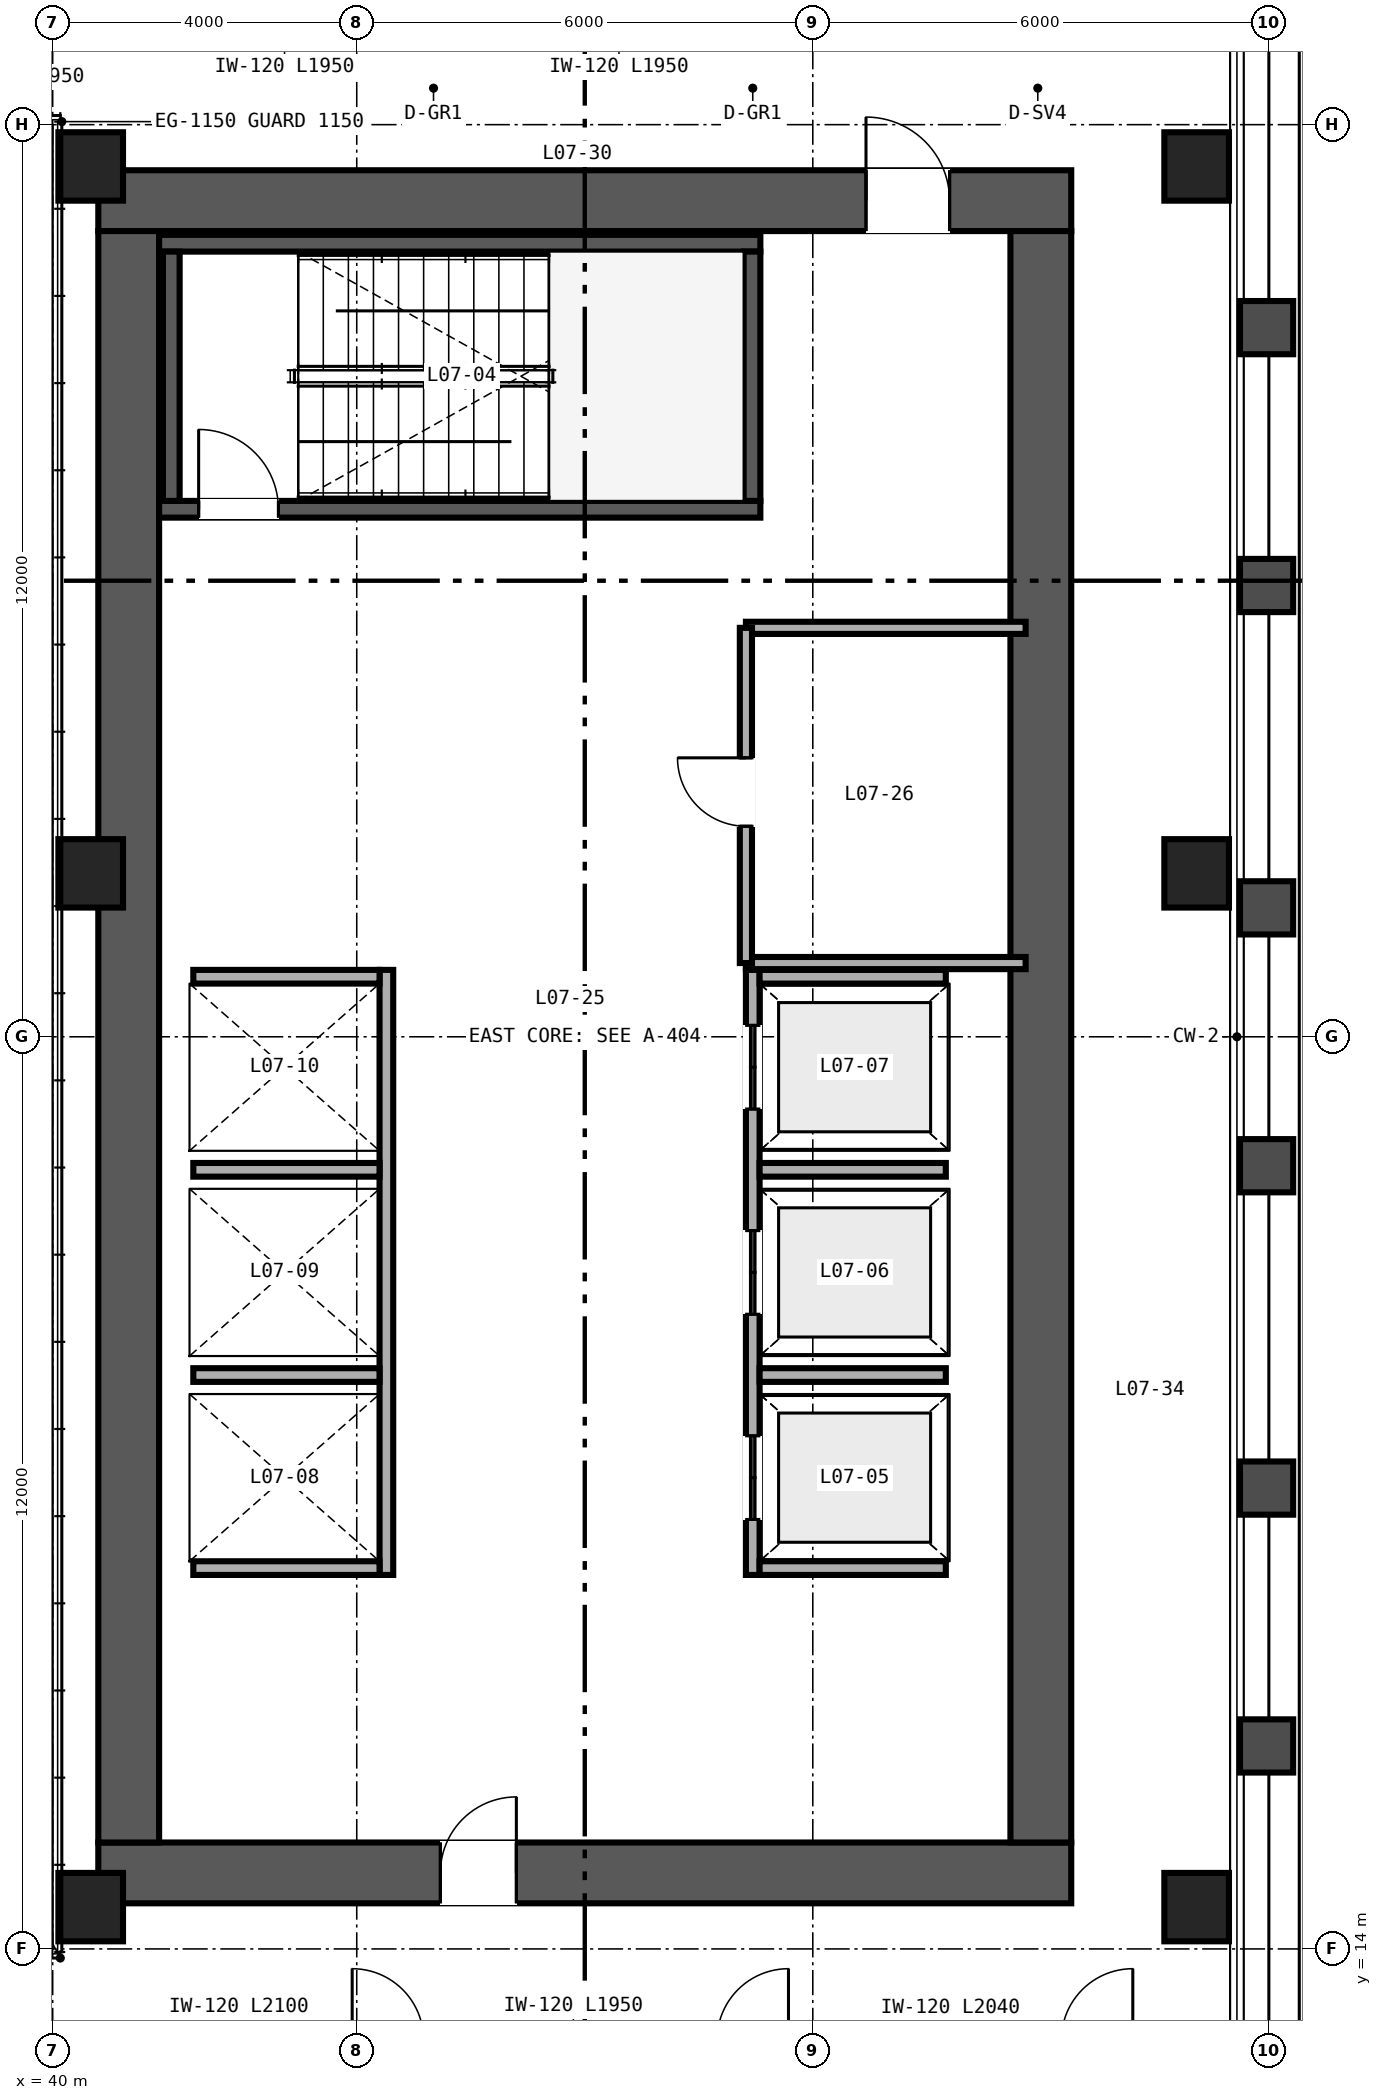
"""IFC4 building model, lengths in metres.
Left out: names, types, materials, properties, quantities, classifications, styles, units other than length and angle.
Written with IfcOpenShell. Run it as: python <this file> out.ifc"""

import sys

from ifc_helpers import new_model, si_unit, direction, frame, frame_2d, origin, origin_2d, place, context, subcontext, project, spatial, rectangle, hollow_rectangle, extrude, source, transform, mapped, element, fill, save


model = new_model("IFC4")
c1 = context("Model", 3, precision=1e-05, world=origin(), true_north=direction((0.0, 1.0)))
c2 = subcontext(c1, "Body", "Model", "MODEL_VIEW")
j1 = project(units=[si_unit("LENGTHUNIT", "METRE"), si_unit("PLANEANGLEUNIT", "RADIAN")], contexts=[c1])
p1 = place(None, origin())
s1 = spatial("IfcSite", under=j1, at=p1, CompositionType="ELEMENT")
p2 = place(p1, origin())
s2 = spatial("IfcBuilding", under=s1, at=p2, CompositionType="ELEMENT")
p3 = place(p2, frame((0.0, 0.0, 34.8)))
s3 = spatial("IfcBuildingStorey", under=s2, at=p3, CompositionType="ELEMENT", Elevation=34.8)
p4 = place(p3, frame((40.6, 15.0, 0.0), z_axis=(0.0, 0.0, 1.0), x_axis=(1.0, 0.0, 0.0)))
e1 = element("IfcWall", 1, at=p4, inside=s3, PredefinedType="SHEAR", context=c2, shape_type="SweptSolid", body=[
    extrude(rectangle(XDim=12.8, YDim=0.8, at=frame_2d((6.4, 0.0))), origin(), (0.0, 0.0, 1.0), 3.35),
])
p5 = place(p4, frame((4.5, 0.0, 0.0)))
e2 = element("IfcOpeningElement", 2, at=p5, cuts=e1, PredefinedType="OPENING", context=c2, shape_type="SweptSolid", body=[
    extrude(rectangle(XDim=1.0, YDim=2.15, at=frame_2d((0.5, 1.075))), frame((0.0, 0.41, 0.0), z_axis=(0.0, -1.0, 0.0), x_axis=(1.0, 0.0, 0.0)), (0.0, 0.0, 1.0), 0.82),
])
p6 = place(p3, frame((40.6, 37.0, 0.0), z_axis=(0.0, 0.0, 1.0), x_axis=(1.0, 0.0, 0.0)))
e3 = element("IfcWall", 3, at=p6, inside=s3, PredefinedType="SHEAR", context=c2, shape_type="SweptSolid", body=[
    extrude(rectangle(XDim=12.8, YDim=0.8, at=frame_2d((6.4, 0.0))), origin(), (0.0, 0.0, 1.0), 3.35),
])
p7 = place(p6, frame((10.1, 0.0, 0.0)))
e4 = element("IfcOpeningElement", 4, at=p7, cuts=e3, PredefinedType="OPENING", context=c2, shape_type="SweptSolid", body=[
    extrude(rectangle(XDim=1.1, YDim=2.15, at=frame_2d((0.55, 1.075))), frame((0.0, 0.41, 0.0), z_axis=(0.0, -1.0, 0.0), x_axis=(1.0, 0.0, 0.0)), (0.0, 0.0, 1.0), 0.82),
])
for number, where, z_axis, x_axis in (
    (5, (41.0, 15.4, 0.0), (0.0, 0.0, 1.0), (0.0, 1.0, 0.0)),
    (6, (53.0, 15.4, 0.0), (0.0, 0.0, 1.0), (0.0, 1.0, 0.0)),
):
    element("IfcWall", number, at=place(p3, frame(where, z_axis=z_axis, x_axis=x_axis)), inside=s3, PredefinedType="SHEAR", context=c2, shape_type="SweptSolid", body=[
        extrude(rectangle(XDim=21.2, YDim=0.8, at=frame_2d((10.6, 0.0))), origin(), (0.0, 0.0, 1.0), 3.35),
    ])
p8 = place(p3, frame((41.4, 32.94, 0.0), z_axis=(0.0, 0.0, 1.0), x_axis=(1.0, 0.0, 0.0)))
e7 = element("IfcWall", 7, at=p8, inside=s3, PredefinedType="SHEAR", context=c2, shape_type="SweptSolid", body=[
    extrude(rectangle(XDim=7.91, YDim=0.22, at=frame_2d((3.955, 0.0))), origin(), (0.0, 0.0, 1.0), 3.4),
])
p9 = place(p8, frame((0.52, 0.0, 0.0)))
e8 = element("IfcOpeningElement", 8, at=p9, cuts=e7, PredefinedType="OPENING", context=c2, shape_type="SweptSolid", body=[
    extrude(rectangle(XDim=1.05, YDim=2.15, at=frame_2d((0.525, 1.075))), frame((0.0, 0.12, 0.0), z_axis=(0.0, -1.0, 0.0), x_axis=(1.0, 0.0, 0.0)), (0.0, 0.0, 1.0), 0.24),
])
p10 = place(p3, frame((41.4, 36.44, 0.0), z_axis=(0.0, 0.0, 1.0), x_axis=(1.0, 0.0, 0.0)))
e9 = element("IfcWall", 9, at=p10, inside=s3, PredefinedType="SHEAR", context=c2, shape_type="SweptSolid", body=[
    extrude(rectangle(XDim=7.91, YDim=0.22, at=frame_2d((3.955, 0.0))), origin(), (0.0, 0.0, 1.0), 3.4),
])
for number, where, z_axis, x_axis in (
    (10, (41.56, 33.05, 0.0), (0.0, 0.0, 1.0), (0.0, 1.0, 0.0)),
    (11, (49.2, 33.05, 0.0), (0.0, 0.0, 1.0), (0.0, 1.0, 0.0)),
):
    element("IfcWall", number, at=place(p3, frame(where, z_axis=z_axis, x_axis=x_axis)), inside=s3, PredefinedType="SHEAR", context=c2, shape_type="SweptSolid", body=[
        extrude(rectangle(XDim=3.28, YDim=0.22, at=frame_2d((1.64, 0.0))), origin(), (0.0, 0.0, 1.0), 3.4),
    ])
m1 = source(origin(), c2, "Body", "SweptSolid", [
    extrude(hollow_rectangle(XDim=0.85, YDim=0.9, WallThickness=0.04, at=origin_2d()), origin(), (0.0, 0.0, 1.0), 3.35),
])
for number, where, z_axis, x_axis in (
    (12, (40.5, 14.55, 0.0), (0.0, 0.0, 1.0), (1.0, 0.0, 0.0)),
    (13, (55.05, 14.55, 0.0), (0.0, 0.0, 1.0), (1.0, 0.0, 0.0)),
    (14, (40.5, 28.15, 0.0), (0.0, 0.0, 1.0), (1.0, 0.0, 0.0)),
    (15, (55.05, 28.15, 0.0), (0.0, 0.0, 1.0), (1.0, 0.0, 0.0)),
    (16, (40.5, 37.45, 0.0), (0.0, 0.0, 1.0), (1.0, 0.0, 0.0)),
    (17, (55.05, 37.45, 0.0), (0.0, 0.0, 1.0), (1.0, 0.0, 0.0)),
):
    element("IfcColumn", number, at=place(p3, frame(where, z_axis=z_axis, x_axis=x_axis)), inside=s3, PredefinedType="COLUMN", context=c2, shape_type="MappedRepresentation", body=[
        mapped(m1, transform((0.0, 0.0, 0.0), scale=1.0)),
    ])
p11 = place(p3, frame((49.21, 18.92, 0.0), z_axis=(0.0, 0.0, 1.0), x_axis=(0.0, 1.0, 0.0)))
e18 = element("IfcWall", 18, at=p11, inside=s3, PredefinedType="SOLIDWALL", context=c2, shape_type="SweptSolid", body=[
    extrude(rectangle(XDim=7.96, YDim=0.18, at=frame_2d((3.98, 0.0))), origin(), (0.0, 0.0, 1.0), 3.35),
])
p12 = place(p11, frame((0.73, 0.0, 0.0)))
e19 = element("IfcOpeningElement", 19, at=p12, cuts=e18, PredefinedType="OPENING", context=c2, shape_type="SweptSolid", body=[
    extrude(rectangle(XDim=1.1, YDim=2.2, at=frame_2d((0.55, 1.1))), frame((0.0, 0.1, 0.0), z_axis=(0.0, -1.0, 0.0), x_axis=(1.0, 0.0, 0.0)), (0.0, 0.0, 1.0), 0.2),
])
p13 = place(p11, frame((3.43, 0.0, 0.0)))
e20 = element("IfcOpeningElement", 20, at=p13, cuts=e18, PredefinedType="OPENING", context=c2, shape_type="SweptSolid", body=[
    extrude(rectangle(XDim=1.1, YDim=2.2, at=frame_2d((0.55, 1.1))), frame((0.0, 0.1, 0.0), z_axis=(0.0, -1.0, 0.0), x_axis=(1.0, 0.0, 0.0)), (0.0, 0.0, 1.0), 0.2),
])
p14 = place(p11, frame((6.13, 0.0, 0.0)))
e21 = element("IfcOpeningElement", 21, at=p14, cuts=e18, PredefinedType="OPENING", context=c2, shape_type="SweptSolid", body=[
    extrude(rectangle(XDim=1.1, YDim=2.2, at=frame_2d((0.55, 1.1))), frame((0.0, 0.1, 0.0), z_axis=(0.0, -1.0, 0.0), x_axis=(1.0, 0.0, 0.0)), (0.0, 0.0, 1.0), 0.2),
])
for number, where, z_axis, x_axis in (
    (22, (49.3, 19.01, 0.0), (0.0, 0.0, 1.0), (1.0, 0.0, 0.0)),
    (23, (49.3, 26.79, 0.0), (0.0, 0.0, 1.0), (1.0, 0.0, 0.0)),
    (24, (49.3, 21.55, 0.0), (0.0, 0.0, 1.0), (1.0, 0.0, 0.0)),
    (25, (49.3, 24.25, 0.0), (0.0, 0.0, 1.0), (1.0, 0.0, 0.0)),
):
    element("IfcWall", number, at=place(p3, frame(where, z_axis=z_axis, x_axis=x_axis)), inside=s3, PredefinedType="SOLIDWALL", context=c2, shape_type="SweptSolid", body=[
        extrude(rectangle(XDim=2.45, YDim=0.18, at=frame_2d((1.225, 0.0))), origin(), (0.0, 0.0, 1.0), 3.35),
    ])
p15 = place(p3, frame((44.39, 18.92, 0.0), z_axis=(0.0, 0.0, 1.0), x_axis=(0.0, 1.0, 0.0)))
e26 = element("IfcWall", 26, at=p15, inside=s3, PredefinedType="SOLIDWALL", context=c2, shape_type="SweptSolid", body=[
    extrude(rectangle(XDim=7.96, YDim=0.18, at=frame_2d((3.98, 0.0))), origin(), (0.0, 0.0, 1.0), 3.35),
])
for number, where, z_axis, x_axis in (
    (27, (41.85, 19.01, 0.0), (0.0, 0.0, 1.0), (1.0, 0.0, 0.0)),
    (28, (41.85, 26.79, 0.0), (0.0, 0.0, 1.0), (1.0, 0.0, 0.0)),
    (29, (41.85, 21.55, 0.0), (0.0, 0.0, 1.0), (1.0, 0.0, 0.0)),
    (30, (41.85, 24.25, 0.0), (0.0, 0.0, 1.0), (1.0, 0.0, 0.0)),
):
    element("IfcWall", number, at=place(p3, frame(where, z_axis=z_axis, x_axis=x_axis)), inside=s3, PredefinedType="SOLIDWALL", context=c2, shape_type="SweptSolid", body=[
        extrude(rectangle(XDim=2.45, YDim=0.18, at=frame_2d((1.225, 0.0))), origin(), (0.0, 0.0, 1.0), 3.35),
    ])
p16 = place(p3, frame((49.12, 26.97, 0.0), z_axis=(0.0, 0.0, 1.0), x_axis=(1.0, 0.0, 0.0)))
e31 = element("IfcWall", 31, at=p16, inside=s3, PredefinedType="PARTITIONING", context=c2, shape_type="SweptSolid", body=[
    extrude(rectangle(XDim=3.68, YDim=0.16, at=frame_2d((1.84, 0.0))), origin(), (0.0, 0.0, 1.0), 3.35),
])
p17 = place(p3, frame((49.12, 31.38, 0.0), z_axis=(0.0, 0.0, 1.0), x_axis=(1.0, 0.0, 0.0)))
e32 = element("IfcWall", 32, at=p17, inside=s3, PredefinedType="PARTITIONING", context=c2, shape_type="SweptSolid", body=[
    extrude(rectangle(XDim=3.68, YDim=0.16, at=frame_2d((1.84, 0.0))), origin(), (0.0, 0.0, 1.0), 2.36),
])
p18 = place(p3, frame((49.12, 26.97, 0.0), z_axis=(0.0, 0.0, 1.0), x_axis=(0.0, 1.0, 0.0)))
e33 = element("IfcWall", 33, at=p18, inside=s3, PredefinedType="PARTITIONING", context=c2, shape_type="SweptSolid", body=[
    extrude(rectangle(XDim=4.41, YDim=0.16, at=frame_2d((2.205, 0.0))), origin(), (0.0, 0.0, 1.0), 2.36),
])
p19 = place(p18, frame((1.8, 0.0, 0.0)))
e34 = element("IfcOpeningElement", 34, at=p19, cuts=e33, PredefinedType="OPENING", context=c2, shape_type="SweptSolid", body=[
    extrude(rectangle(XDim=0.9, YDim=2.15, at=frame_2d((0.45, 1.075))), frame((0.0, 0.09, 0.0), z_axis=(0.0, -1.0, 0.0), x_axis=(1.0, 0.0, 0.0)), (0.0, 0.0, 1.0), 0.18),
])
m2 = source(origin(), c2, "Body", "SweptSolid", [
    extrude(rectangle(XDim=1.05, YDim=2.15, at=frame_2d((0.525, 1.075))), frame((0.0, 0.025, 0.0), z_axis=(0.0, -1.0, 0.0), x_axis=(1.0, 0.0, 0.0)), (0.0, 0.0, 1.0), 0.05),
])
p20 = place(p9, origin())
e35 = element("IfcDoor", 35, at=p20, inside=s3, OperationType="SINGLE_SWING_LEFT", PredefinedType="DOOR", context=c2, shape_type="MappedRepresentation", body=[
    mapped(m2, transform((0.0, 0.0, 0.0), scale=1.0)),
])
fill(e8, e35)
m3 = source(origin(), c2, "Body", "SweptSolid", [
    extrude(rectangle(XDim=1.1, YDim=2.2, at=frame_2d((0.55, 1.1))), frame((0.0, 0.025, 0.0), z_axis=(0.0, -1.0, 0.0), x_axis=(1.0, 0.0, 0.0)), (0.0, 0.0, 1.0), 0.05),
])
p21 = place(p12, origin())
e36 = element("IfcDoor", 36, at=p21, inside=s3, OperationType="DOUBLE_DOOR_SLIDING", PredefinedType="DOOR", context=c2, shape_type="MappedRepresentation", body=[
    mapped(m3, transform((0.0, 0.0, 0.0), scale=1.0)),
])
fill(e19, e36)
p22 = place(p13, origin())
e37 = element("IfcDoor", 37, at=p22, inside=s3, OperationType="DOUBLE_DOOR_SLIDING", PredefinedType="DOOR", context=c2, shape_type="MappedRepresentation", body=[
    mapped(m3, transform((0.0, 0.0, 0.0), scale=1.0)),
])
fill(e20, e37)
p23 = place(p14, origin())
e38 = element("IfcDoor", 38, at=p23, inside=s3, OperationType="DOUBLE_DOOR_SLIDING", PredefinedType="DOOR", context=c2, shape_type="MappedRepresentation", body=[
    mapped(m3, transform((0.0, 0.0, 0.0), scale=1.0)),
])
fill(e21, e38)
m4 = source(origin(), c2, "Body", "SweptSolid", [
    extrude(rectangle(XDim=1.0, YDim=2.15, at=frame_2d((0.5, 1.075))), frame((0.0, 0.025, 0.0), z_axis=(0.0, -1.0, 0.0), x_axis=(1.0, 0.0, 0.0)), (0.0, 0.0, 1.0), 0.05),
])
p24 = place(p5, origin())
e39 = element("IfcDoor", 39, at=p24, inside=s3, OperationType="SINGLE_SWING_RIGHT", PredefinedType="DOOR", context=c2, shape_type="MappedRepresentation", body=[
    mapped(m4, transform((0.0, 0.0, 0.0), scale=1.0)),
])
fill(e2, e39)
m5 = source(origin(), c2, "Body", "SweptSolid", [
    extrude(rectangle(XDim=1.1, YDim=2.15, at=frame_2d((0.55, 1.075))), frame((0.0, 0.025, 0.0), z_axis=(0.0, -1.0, 0.0), x_axis=(1.0, 0.0, 0.0)), (0.0, 0.0, 1.0), 0.05),
])
p25 = place(p7, origin())
e40 = element("IfcDoor", 40, at=p25, inside=s3, OperationType="SINGLE_SWING_LEFT", PredefinedType="DOOR", context=c2, shape_type="MappedRepresentation", body=[
    mapped(m5, transform((0.0, 0.0, 0.0), scale=1.0)),
])
fill(e4, e40)
m6 = source(origin(), c2, "Body", "SweptSolid", [
    extrude(rectangle(XDim=0.9, YDim=2.15, at=frame_2d((0.45, 1.075))), frame((0.0, 0.025, 0.0), z_axis=(0.0, -1.0, 0.0), x_axis=(1.0, 0.0, 0.0)), (0.0, 0.0, 1.0), 0.05),
])
p26 = place(p19, origin())
e41 = element("IfcDoor", 41, at=p26, inside=s3, OperationType="SINGLE_SWING_RIGHT", PredefinedType="DOOR", context=c2, shape_type="MappedRepresentation", body=[
    mapped(m6, transform((0.0, 0.0, 0.0), scale=1.0)),
])
fill(e34, e41)
save(model, sys.argv[1])
